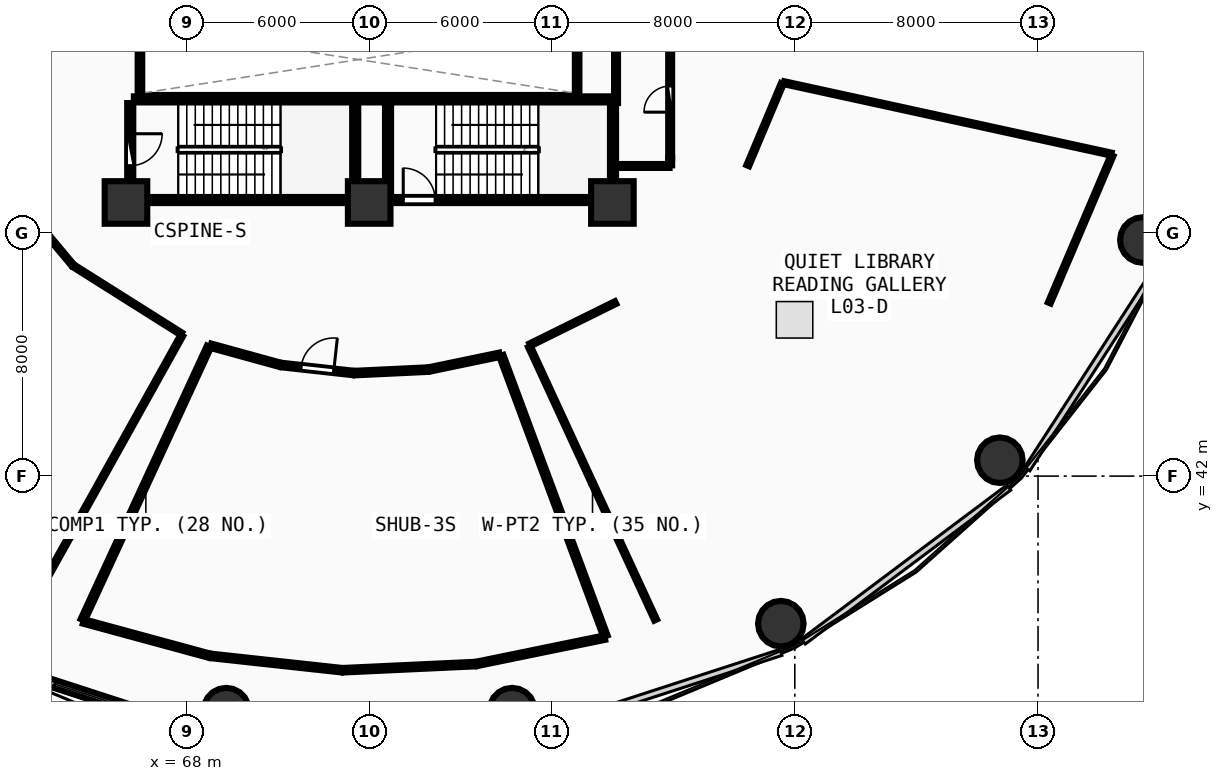
"""IFC4 building model, lengths in metres.
Left out: names, types, materials, properties, quantities, classifications, styles, units other than length and angle.
Written with IfcOpenShell. Run it as: python <this file> out.ifc"""

import sys

from ifc_helpers import new_model, si_unit, direction, frame, frame_2d, origin, origin_2d, place, context, subcontext, project, spatial, rectangle, circle, extrude, element, fill, save


model = new_model("IFC4")
c1 = context("Model", 3, precision=1e-05, world=origin(), true_north=direction((0.0, 1.0)))
c2 = subcontext(c1, "Body", "Model", "MODEL_VIEW")
j1 = project(units=[si_unit("LENGTHUNIT", "METRE"), si_unit("PLANEANGLEUNIT", "RADIAN")], contexts=[c1])
p1 = place(None, origin())
s1 = spatial("IfcSite", under=j1, at=p1, CompositionType="ELEMENT")
p2 = place(p1, origin())
s2 = spatial("IfcBuilding", under=s1, at=p2, CompositionType="ELEMENT")
p3 = place(p2, frame((0.0, 0.0, 13.5)))
s3 = spatial("IfcBuildingStorey", under=s2, at=p3, CompositionType="ELEMENT", Elevation=13.5)
for number, where, z_axis, x_axis in (
    (1, (66.0, 51.0, 0.0), (0.0, 0.0, 1.0), (1.0, 0.0, 0.0)),
    (2, (74.0, 51.0, 0.0), (0.0, 0.0, 1.0), (1.0, 0.0, 0.0)),
    (3, (82.0, 51.0, 0.0), (0.0, 0.0, 1.0), (1.0, 0.0, 0.0)),
):
    element("IfcColumn", number, at=place(p3, frame(where, z_axis=z_axis, x_axis=x_axis)), inside=s3, PredefinedType="PILASTER", context=c2, shape_type="SweptSolid", body=[
        extrude(rectangle(XDim=1.4, YDim=1.4, at=origin_2d()), origin(), (0.0, 0.0, 1.0), 4.5),
    ])
for number, where, z_axis, x_axis in (
    (4, (69.298, 34.286, 0.0), (0.0, 0.0, 1.0), (1.0, 0.0, 0.0)),
    (5, (78.702, 34.286, 0.0), (0.0, 0.0, 1.0), (1.0, 0.0, 0.0)),
    (6, (87.54, 37.146, 0.0), (0.0, 0.0, 1.0), (1.0, 0.0, 0.0)),
    (7, (94.744, 42.522, 0.0), (0.0, 0.0, 1.0), (1.0, 0.0, 0.0)),
    (8, (99.447, 49.764, 0.0), (0.0, 0.0, 1.0), (1.0, 0.0, 0.0)),
):
    element("IfcColumn", number, at=place(p3, frame(where, z_axis=z_axis, x_axis=x_axis)), inside=s3, PredefinedType="COLUMN", context=c2, shape_type="SweptSolid", body=[
        extrude(circle(Radius=0.75, at=origin_2d()), origin(), (0.0, 0.0, 1.0), 4.5),
    ])
p4 = place(p3, frame((60.526, 36.178, 0.0), z_axis=(0.0, 0.0, 1.0), x_axis=(0.951039914291, -0.309068085421, 0.0)))
e9 = element("IfcWall", 9, at=p4, inside=s3, PredefinedType="SOLIDWALL", context=c2, shape_type="SweptSolid", body=[
    extrude(rectangle(XDim=8.594, YDim=0.26, at=frame_2d((4.297, 0.0))), origin(), (0.0, 0.0, 1.0), 4.085),
])
p5 = place(p4, frame((3.297, 0.0, 0.85)))
e10 = element("IfcOpeningElement", 10, at=p5, cuts=e9, PredefinedType="OPENING", context=c2, shape_type="SweptSolid", body=[
    extrude(rectangle(XDim=2.0, YDim=1.75, at=frame_2d((1.0, 0.875))), frame((0.0, 0.14, 0.0), z_axis=(0.0, -1.0, 0.0), x_axis=(1.0, 0.0, 0.0)), (0.0, 0.0, 1.0), 0.28),
])
p6 = place(p3, frame((74.0, 51.08, 0.0), z_axis=(0.0, 0.0, 1.0), x_axis=(1.0, 0.0, 0.0)))
e11 = element("IfcWall", 11, at=p6, inside=s3, PredefinedType="SHEAR", context=c2, shape_type="SweptSolid", body=[
    extrude(rectangle(XDim=7.9, YDim=0.2, at=frame_2d((3.95, 0.0))), origin(), (0.0, 0.0, 1.0), 4.1),
])
p7 = place(p6, frame((1.12, 0.0, 0.0)))
e12 = element("IfcOpeningElement", 12, at=p7, cuts=e11, PredefinedType="OPENING", context=c2, shape_type="SweptSolid", body=[
    extrude(rectangle(XDim=1.05, YDim=2.1, at=frame_2d((0.525, 1.05))), frame((0.0, 0.11, 0.0), z_axis=(0.0, -1.0, 0.0), x_axis=(1.0, 0.0, 0.0)), (0.0, 0.0, 1.0), 0.22),
])
p8 = place(p3, frame((82.02, 51.2, 0.0), z_axis=(0.0, 0.0, 1.0), x_axis=(0.0, 1.0, 0.0)))
e13 = element("IfcWall", 13, at=p8, inside=s3, PredefinedType="SHEAR", context=c2, shape_type="SweptSolid", body=[
    extrude(rectangle(XDim=3.07, YDim=0.2, at=frame_2d((1.535, 0.0))), origin(), (0.0, 0.0, 1.0), 4.1),
])
p9 = place(p3, frame((81.9, 54.39, 0.0), z_axis=(0.0, 0.0, 1.0), x_axis=(-1.0, 0.0, 0.0)))
e14 = element("IfcWall", 14, at=p9, inside=s3, PredefinedType="SHEAR", context=c2, shape_type="SweptSolid", body=[
    extrude(rectangle(XDim=8.46, YDim=0.2, at=frame_2d((4.23, 0.0))), origin(), (0.0, 0.0, 1.0), 4.1),
])
p10 = place(p3, frame((74.62, 54.27, 0.0), z_axis=(0.0, 0.0, 1.0), x_axis=(0.0, -1.0, 0.0)))
e15 = element("IfcWall", 15, at=p10, inside=s3, PredefinedType="SHEAR", context=c2, shape_type="SweptSolid", body=[
    extrude(rectangle(XDim=3.07, YDim=0.2, at=frame_2d((1.535, 0.0))), origin(), (0.0, 0.0, 1.0), 4.1),
])
p11 = place(p3, frame((66.26, 51.08, 0.0), z_axis=(0.0, 0.0, 1.0), x_axis=(1.0, 0.0, 0.0)))
e16 = element("IfcWall", 16, at=p11, inside=s3, PredefinedType="SHEAR", context=c2, shape_type="SweptSolid", body=[
    extrude(rectangle(XDim=7.16, YDim=0.2, at=frame_2d((3.58, 0.0))), origin(), (0.0, 0.0, 1.0), 4.1),
])
p12 = place(p3, frame((73.54, 51.2, 0.0), z_axis=(0.0, 0.0, 1.0), x_axis=(0.0, 1.0, 0.0)))
e17 = element("IfcWall", 17, at=p12, inside=s3, PredefinedType="SHEAR", context=c2, shape_type="SweptSolid", body=[
    extrude(rectangle(XDim=3.07, YDim=0.2, at=frame_2d((1.535, 0.0))), origin(), (0.0, 0.0, 1.0), 4.1),
])
p13 = place(p3, frame((73.42, 54.39, 0.0), z_axis=(0.0, 0.0, 1.0), x_axis=(-1.0, 0.0, 0.0)))
e18 = element("IfcWall", 18, at=p13, inside=s3, PredefinedType="SHEAR", context=c2, shape_type="SweptSolid", body=[
    extrude(rectangle(XDim=7.16, YDim=0.2, at=frame_2d((3.58, 0.0))), origin(), (0.0, 0.0, 1.0), 4.1),
])
p14 = place(p3, frame((66.14, 54.27, 0.0), z_axis=(0.0, 0.0, 1.0), x_axis=(0.0, -1.0, 0.0)))
e19 = element("IfcWall", 19, at=p14, inside=s3, PredefinedType="SHEAR", context=c2, shape_type="SweptSolid", body=[
    extrude(rectangle(XDim=3.07, YDim=0.2, at=frame_2d((1.535, 0.0))), origin(), (0.0, 0.0, 1.0), 4.1),
])
p15 = place(p14, frame((1.01, 0.0, 0.0)))
e20 = element("IfcOpeningElement", 20, at=p15, cuts=e19, PredefinedType="OPENING", context=c2, shape_type="SweptSolid", body=[
    extrude(rectangle(XDim=1.05, YDim=2.1, at=frame_2d((0.525, 1.05))), frame((0.0, 0.11, 0.0), z_axis=(0.0, -1.0, 0.0), x_axis=(1.0, 0.0, 0.0)), (0.0, 0.0, 1.0), 0.22),
])
for number, where, z_axis, x_axis in (
    (21, (66.46, 54.48, 0.0), (0.0, 0.0, 1.0), (0.0, 1.0, 0.0)),
    (22, (80.84, 54.48, 0.0), (0.0, 0.0, 1.0), (0.0, 1.0, 0.0)),
):
    element("IfcWall", number, at=place(p3, frame(where, z_axis=z_axis, x_axis=x_axis)), inside=s3, PredefinedType="PARTITIONING", context=c2, shape_type="SweptSolid", body=[
        extrude(rectangle(XDim=2.29, YDim=0.15, at=frame_2d((1.145, 0.0))), origin(), (0.0, 0.0, 1.0), 4.09),
    ])
p16 = place(p3, frame((83.9, 52.46, 0.0), z_axis=(0.0, 0.0, 1.0), x_axis=(0.0, 1.0, 0.0)))
e23 = element("IfcWall", 23, at=p16, inside=s3, PredefinedType="PLUMBINGWALL", context=c2, shape_type="SweptSolid", body=[
    extrude(rectangle(XDim=3.88, YDim=0.13, at=frame_2d((1.94, 0.0))), origin(), (0.0, 0.0, 1.0), 4.09),
])
p17 = place(p16, frame((1.51, 0.0, 0.0)))
e24 = element("IfcOpeningElement", 24, at=p17, cuts=e23, PredefinedType="OPENING", context=c2, shape_type="SweptSolid", body=[
    extrude(rectangle(XDim=0.86, YDim=2.05, at=frame_2d((0.43, 1.025))), frame((0.0, 0.075, 0.0), z_axis=(0.0, -1.0, 0.0), x_axis=(1.0, 0.0, 0.0)), (0.0, 0.0, 1.0), 0.15),
])
p18 = place(p3, frame((71.145, 45.649, 0.0), z_axis=(0.0, 0.0, 1.0), x_axis=(0.993951535734, -0.109819600308, 0.0)))
e25 = element("IfcWall", 25, at=p18, inside=s3, PredefinedType="PARTITIONING", context=c2, shape_type="SweptSolid", body=[
    extrude(rectangle(XDim=2.321, YDim=0.15, at=frame_2d((1.16, 0.0))), origin(), (0.0, 0.0, 1.0), 4.09),
])
p19 = place(p18, frame((0.62, 0.0, 0.0)))
e26 = element("IfcOpeningElement", 26, at=p19, cuts=e25, PredefinedType="OPENING", context=c2, shape_type="SweptSolid", body=[
    extrude(rectangle(XDim=1.08, YDim=2.1, at=frame_2d((0.54, 1.05))), frame((0.0, 0.085, 0.0), z_axis=(0.0, -1.0, 0.0), x_axis=(1.0, 0.0, 0.0)), (0.0, 0.0, 1.0), 0.17),
])
p20 = place(p3, frame((82.14, 52.2, 0.0), z_axis=(0.0, 0.0, 1.0), x_axis=(1.0, 0.0, 0.0)))
e27 = element("IfcWall", 27, at=p20, inside=s3, PredefinedType="PLUMBINGWALL", context=c2, shape_type="SweptSolid", body=[
    extrude(rectangle(XDim=1.74, YDim=0.13, at=frame_2d((0.87, 0.0))), origin(), (0.0, 0.0, 1.0), 3.385),
])
p21 = place(p3, frame((83.9, 52.22, 0.0), z_axis=(0.0, 0.0, 1.0), x_axis=(0.0, 1.0, 0.0)))
e28 = element("IfcWall", 28, at=p21, inside=s3, PredefinedType="PLUMBINGWALL", context=c2, shape_type="SweptSolid", body=[
    extrude(rectangle(XDim=0.24, YDim=0.13, at=frame_2d((0.12, 0.0))), origin(), (0.0, 0.0, 1.0), 4.09),
])
p22 = place(p3, frame((82.12, 56.58, 0.0), z_axis=(0.0, 0.0, 1.0), x_axis=(0.0, -1.0, 0.0)))
e29 = element("IfcWall", 29, at=p22, inside=s3, PredefinedType="PLUMBINGWALL", context=c2, shape_type="SweptSolid", body=[
    extrude(rectangle(XDim=2.31, YDim=0.13, at=frame_2d((1.155, 0.0))), origin(), (0.0, 0.0, 1.0), 3.385),
])
p23 = place(p3, frame((61.647, 52.044, 0.0), z_axis=(0.0, 0.0, 1.0), x_axis=(0.641987153188, -0.766715393834, 0.0)))
e30 = element("IfcWall", 30, at=p23, inside=s3, PredefinedType="PARTITIONING", context=c2, shape_type="SweptSolid", body=[
    extrude(rectangle(XDim=4.032, YDim=0.1, at=frame_2d((2.016, 0.0))), origin(), (0.0, 0.0, 1.0), 3.485),
])
p24 = place(p3, frame((64.295, 48.901, 0.0), z_axis=(0.0, 0.0, 1.0), x_axis=(0.845938242176, -0.533280873859, 0.0)))
e31 = element("IfcWall", 31, at=p24, inside=s3, PredefinedType="PARTITIONING", context=c2, shape_type="SweptSolid", body=[
    extrude(rectangle(XDim=4.167, YDim=0.1, at=frame_2d((2.084, 0.0))), origin(), (0.0, 0.0, 1.0), 3.485),
])
p25 = place(p3, frame((67.834, 46.622, 0.0), z_axis=(0.0, 0.0, 1.0), x_axis=(-0.486981509144, -0.873412279368, 0.0)))
e32 = element("IfcWall", 32, at=p25, inside=s3, PredefinedType="PARTITIONING", context=c2, shape_type="SweptSolid", body=[
    extrude(rectangle(XDim=9.984, YDim=0.1, at=frame_2d((4.992, 0.0))), origin(), (0.0, 0.0, 1.0), 3.485),
])
p26 = place(p3, frame((68.787, 46.288, 0.0), z_axis=(0.0, 0.0, 1.0), x_axis=(0.964162769641, -0.265311427644, 0.0)))
e33 = element("IfcWall", 33, at=p26, inside=s3, PredefinedType="PARTITIONING", context=c2, shape_type="SweptSolid", body=[
    extrude(rectangle(XDim=2.344, YDim=0.15, at=frame_2d((1.172, 0.0))), origin(), (0.0, 0.0, 1.0), 4.09),
])
p27 = place(p3, frame((73.551, 45.39, 0.0), z_axis=(0.0, 0.0, 1.0), x_axis=(0.998889082162, 0.047123258997, 0.0)))
e34 = element("IfcWall", 34, at=p27, inside=s3, PredefinedType="PARTITIONING", context=c2, shape_type="SweptSolid", body=[
    extrude(rectangle(XDim=2.363, YDim=0.15, at=frame_2d((1.181, 0.0))), origin(), (0.0, 0.0, 1.0), 4.09),
])
p28 = place(p3, frame((75.99, 45.511, 0.0), z_axis=(0.0, 0.0, 1.0), x_axis=(0.979038244843, 0.203676496276, 0.0)))
e35 = element("IfcWall", 35, at=p28, inside=s3, PredefinedType="PARTITIONING", context=c2, shape_type="SweptSolid", body=[
    extrude(rectangle(XDim=2.352, YDim=0.15, at=frame_2d((1.176, 0.0))), origin(), (0.0, 0.0, 1.0), 4.09),
])
p29 = place(p3, frame((78.346, 45.96, 0.0), z_axis=(0.0, 0.0, 1.0), x_axis=(0.34819151165, -0.93742342152, 0.0)))
e36 = element("IfcWall", 36, at=p29, inside=s3, PredefinedType="PARTITIONING", context=c2, shape_type="SweptSolid", body=[
    extrude(rectangle(XDim=9.843, YDim=0.15, at=frame_2d((4.921, 0.0))), origin(), (0.0, 0.0, 1.0), 3.485),
])
p30 = place(p3, frame((81.748, 36.688, 0.0), z_axis=(0.0, 0.0, 1.0), x_axis=(-0.979594368282, -0.200984759698, 0.0)))
e37 = element("IfcWall", 37, at=p30, inside=s3, PredefinedType="PARTITIONING", context=c2, shape_type="SweptSolid", body=[
    extrude(rectangle(XDim=4.289, YDim=0.15, at=frame_2d((2.145, 0.0))), origin(), (0.0, 0.0, 1.0), 3.485),
])
p31 = place(p3, frame((77.467, 35.816, 0.0), z_axis=(0.0, 0.0, 1.0), x_axis=(-0.998921063896, -0.046440371493, 0.0)))
e38 = element("IfcWall", 38, at=p31, inside=s3, PredefinedType="PARTITIONING", context=c2, shape_type="SweptSolid", body=[
    extrude(rectangle(XDim=4.311, YDim=0.15, at=frame_2d((2.155, 0.0))), origin(), (0.0, 0.0, 1.0), 4.09),
])
p32 = place(p3, frame((73.081, 35.618, 0.0), z_axis=(0.0, 0.0, 1.0), x_axis=(-0.994118613874, 0.108296729168, 0.0)))
e39 = element("IfcWall", 39, at=p32, inside=s3, PredefinedType="PARTITIONING", context=c2, shape_type="SweptSolid", body=[
    extrude(rectangle(XDim=4.306, YDim=0.15, at=frame_2d((2.153, 0.0))), origin(), (0.0, 0.0, 1.0), 3.485),
])
p33 = place(p3, frame((68.722, 36.1, 0.0), z_axis=(0.0, 0.0, 1.0), x_axis=(-0.964990226836, 0.262285840471, 0.0)))
e40 = element("IfcWall", 40, at=p33, inside=s3, PredefinedType="PARTITIONING", context=c2, shape_type="SweptSolid", body=[
    extrude(rectangle(XDim=4.273, YDim=0.15, at=frame_2d((2.137, 0.0))), origin(), (0.0, 0.0, 1.0), 3.485),
])
p34 = place(p3, frame((64.577, 37.267, 0.0), z_axis=(0.0, 0.0, 1.0), x_axis=(0.419273795464, 0.90785983744, 0.0)))
e41 = element("IfcWall", 41, at=p34, inside=s3, PredefinedType="PARTITIONING", context=c2, shape_type="SweptSolid", body=[
    extrude(rectangle(XDim=9.908, YDim=0.15, at=frame_2d((4.954, 0.0))), origin(), (0.0, 0.0, 1.0), 3.485),
])
p35 = place(p3, frame((79.288, 46.317, 0.0), z_axis=(0.0, 0.0, 1.0), x_axis=(0.896576809432, 0.44288827574, 0.0)))
e42 = element("IfcWall", 42, at=p35, inside=s3, PredefinedType="PARTITIONING", context=c2, shape_type="SweptSolid", body=[
    extrude(rectangle(XDim=3.142, YDim=0.1, at=frame_2d((1.571, 0.0))), origin(), (0.0, 0.0, 1.0), 3.485),
])
p36 = place(p3, frame((86.451, 52.21, 0.0), z_axis=(0.0, 0.0, 1.0), x_axis=(0.388068176064, 0.921630669372, 0.0)))
e43 = element("IfcWall", 43, at=p36, inside=s3, PredefinedType="PARTITIONING", context=c2, shape_type="SweptSolid", body=[
    extrude(rectangle(XDim=2.93, YDim=0.1, at=frame_2d((1.465, 0.0))), origin(), (0.0, 0.0, 1.0), 4.09),
])
p37 = place(p3, frame((87.643, 54.938, 0.0), z_axis=(0.0, 0.0, 1.0), x_axis=(0.977028592708, -0.213108256602, 0.0)))
e44 = element("IfcWall", 44, at=p37, inside=s3, PredefinedType="PARTITIONING", context=c2, shape_type="SweptSolid", body=[
    extrude(rectangle(XDim=11.022, YDim=0.1, at=frame_2d((5.511, 0.0))), origin(), (0.0, 0.0, 1.0), 3.785),
])
p38 = place(p3, frame((98.435, 52.544, 0.0), z_axis=(0.0, 0.0, 1.0), x_axis=(-0.391984730247, -0.919971723073, 0.0)))
e45 = element("IfcWall", 45, at=p38, inside=s3, PredefinedType="PARTITIONING", context=c2, shape_type="SweptSolid", body=[
    extrude(rectangle(XDim=5.272, YDim=0.1, at=frame_2d((2.636, 0.0))), origin(), (0.0, 0.0, 1.0), 3.485),
])
p39 = place(p3, frame((83.423, 37.267, 0.0), z_axis=(0.0, 0.0, 1.0), x_axis=(-0.419273795464, 0.90785983744, 0.0)))
e46 = element("IfcWall", 46, at=p39, inside=s3, PredefinedType="PARTITIONING", context=c2, shape_type="SweptSolid", body=[
    extrude(rectangle(XDim=9.908, YDim=0.1, at=frame_2d((4.954, 0.0))), origin(), (0.0, 0.0, 1.0), 3.485),
])
p40 = place(p5, origin())
e47 = element("IfcWindow", 47, at=p40, inside=s3, PartitioningType="SINGLE_PANEL", PredefinedType="WINDOW", context=c2, shape_type="SweptSolid", body=[
    extrude(rectangle(XDim=2.0, YDim=1.75, at=frame_2d((1.0, 0.875))), frame((0.0, 0.03, 0.0), z_axis=(0.0, -1.0, 0.0), x_axis=(1.0, 0.0, 0.0)), (0.0, 0.0, 1.0), 0.06),
])
fill(e10, e47)
p41 = place(p7, origin())
e48 = element("IfcDoor", 48, at=p41, inside=s3, OperationType="SINGLE_SWING_LEFT", PredefinedType="DOOR", context=c2, shape_type="SweptSolid", body=[
    extrude(rectangle(XDim=1.05, YDim=2.1, at=frame_2d((0.525, 1.05))), frame((0.0, 0.025, 0.0), z_axis=(0.0, -1.0, 0.0), x_axis=(1.0, 0.0, 0.0)), (0.0, 0.0, 1.0), 0.05),
])
fill(e12, e48)
p42 = place(p15, origin())
e49 = element("IfcDoor", 49, at=p42, inside=s3, OperationType="SINGLE_SWING_LEFT", PredefinedType="DOOR", context=c2, shape_type="SweptSolid", body=[
    extrude(rectangle(XDim=1.05, YDim=2.1, at=frame_2d((0.525, 1.05))), frame((0.0, 0.025, 0.0), z_axis=(0.0, -1.0, 0.0), x_axis=(1.0, 0.0, 0.0)), (0.0, 0.0, 1.0), 0.05),
])
fill(e20, e49)
p43 = place(p17, origin())
e50 = element("IfcDoor", 50, at=p43, inside=s3, OperationType="SINGLE_SWING_LEFT", PredefinedType="DOOR", context=c2, shape_type="SweptSolid", body=[
    extrude(rectangle(XDim=0.86, YDim=2.05, at=frame_2d((0.43, 1.025))), frame((0.0, 0.025, 0.0), z_axis=(0.0, -1.0, 0.0), x_axis=(1.0, 0.0, 0.0)), (0.0, 0.0, 1.0), 0.05),
])
fill(e24, e50)
p44 = place(p19, origin())
e51 = element("IfcDoor", 51, at=p44, inside=s3, OperationType="SINGLE_SWING_RIGHT", PredefinedType="DOOR", context=c2, shape_type="SweptSolid", body=[
    extrude(rectangle(XDim=1.08, YDim=2.1, at=frame_2d((0.54, 1.05))), frame((0.0, 0.025, 0.0), z_axis=(0.0, -1.0, 0.0), x_axis=(1.0, 0.0, 0.0)), (0.0, 0.0, 1.0), 0.05),
])
fill(e26, e51)
save(model, sys.argv[1])
